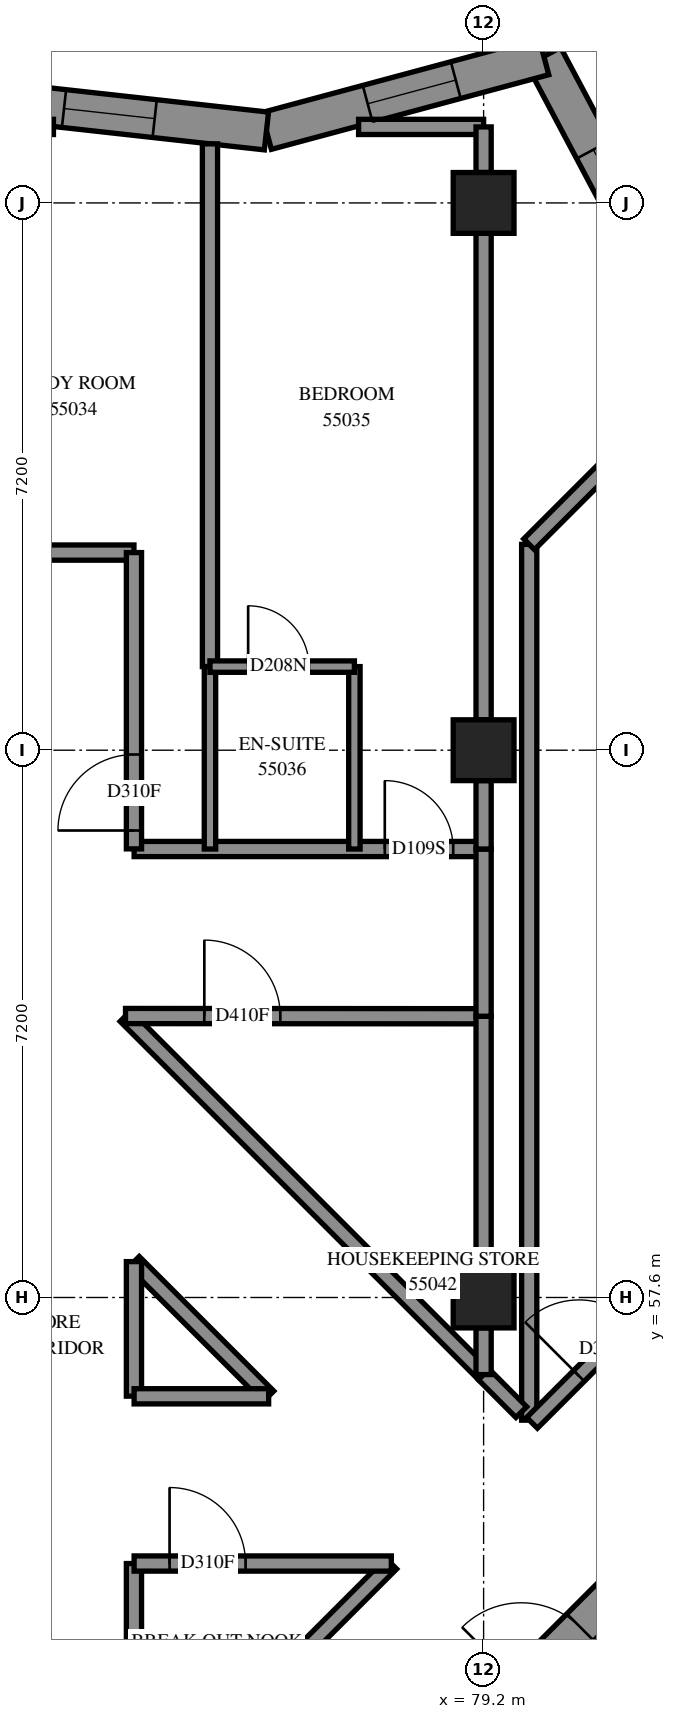
"""IFC4 building model, lengths in metres.
Left out: names, types, materials, properties, quantities, classifications, styles, units other than length and angle.
Written with IfcOpenShell. Run it as: python <this file> out.ifc"""

import sys

from ifc_helpers import new_model, si_unit, direction, frame, frame_2d, origin, origin_2d, place, context, subcontext, project, spatial, polyline, rectangle, outline, extrude, element, fill, save


model = new_model("IFC4")
c1 = context("Model", 3, precision=1e-05, world=origin(), true_north=direction((0.0, 1.0)))
c2 = subcontext(c1, "Body", "Model", "MODEL_VIEW")
j1 = project(units=[si_unit("LENGTHUNIT", "METRE"), si_unit("PLANEANGLEUNIT", "RADIAN")], contexts=[c1])
p1 = place(None, origin())
s1 = spatial("IfcSite", under=j1, at=p1, CompositionType="ELEMENT")
p2 = place(p1, origin())
s2 = spatial("IfcBuilding", under=s1, at=p2, CompositionType="ELEMENT")
p3 = place(p2, frame((0.0, 0.0, 203.2)))
s3 = spatial("IfcBuildingStorey", under=s2, at=p3, CompositionType="ELEMENT", Elevation=203.2)
for number, where, z_axis, x_axis in (
    (1, (79.2, 57.6, 0.0), (0.0, 0.0, 1.0), (1.0, 0.0, 0.0)),
    (2, (79.2, 64.8, 0.0), (0.0, 0.0, 1.0), (1.0, 0.0, 0.0)),
    (3, (79.2, 72.0, 0.0), (0.0, 0.0, 1.0), (1.0, 0.0, 0.0)),
):
    element("IfcColumn", number, at=place(p3, frame(where, z_axis=z_axis, x_axis=x_axis)), inside=s3, PredefinedType="COLUMN", context=c2, shape_type="SweptSolid", body=[
        extrude(rectangle(XDim=0.8, YDim=0.8, at=origin_2d()), origin(), (0.0, 0.0, 1.0), 3.1),
    ])
p4 = place(p3, frame((76.478, 49.267, -0.3), z_axis=(0.0, 0.0, 1.0), x_axis=(0.7071067812, 0.7071067812, 0.0)))
e4 = element("IfcWall", 4, at=p4, inside=s3, PredefinedType="SHEAR", context=c2, shape_type="SweptSolid", body=[
    extrude(rectangle(XDim=14.4, YDim=0.5, at=frame_2d((7.2, 0.0))), origin(), (0.0, 0.0, 1.0), 2.7),
])
p5 = place(p4, frame((4.55, 0.0, 0.3)))
e5 = element("IfcOpeningElement", 5, at=p5, cuts=e4, PredefinedType="OPENING", context=c2, shape_type="SweptSolid", body=[
    extrude(rectangle(XDim=1.1, YDim=2.1, at=frame_2d((0.55, 1.05))), frame((0.0, 0.26, 0.0), z_axis=(0.0, -1.0, 0.0), x_axis=(1.0, 0.0, 0.0)), (0.0, 0.0, 1.0), 0.52),
])
p6 = place(p4, frame((11.35, 0.0, 0.3)))
e6 = element("IfcOpeningElement", 6, at=p6, cuts=e4, PredefinedType="OPENING", context=c2, shape_type="SweptSolid", body=[
    extrude(rectangle(XDim=1.1, YDim=2.1, at=frame_2d((0.55, 1.05))), frame((0.0, 0.26, 0.0), z_axis=(0.0, -1.0, 0.0), x_axis=(1.0, 0.0, 0.0)), (0.0, 0.0, 1.0), 0.52),
])
p7 = place(p3, frame((81.558, 70.978, 0.0), z_axis=(0.0, 0.0, 1.0), x_axis=(-0.4689165571, 0.8832424709, 0.0)))
e7 = element("IfcWall", 7, at=p7, inside=s3, PredefinedType="SOLIDWALL", context=c2, shape_type="SweptSolid", body=[
    extrude(outline(polyline([(0.054, -0.25), (3.539, -0.25), (3.14, 0.25), (-0.054, 0.25), (0.054, -0.25)])), origin(), (0.0, 0.0, 1.0), 3.1),
])
p8 = place(p7, frame((0.75, 0.0, 0.45)))
e8 = element("IfcOpeningElement", 8, at=p8, cuts=e7, PredefinedType="OPENING", context=c2, shape_type="SweptSolid", body=[
    extrude(rectangle(XDim=1.2, YDim=2.5, at=frame_2d((0.6, 1.25))), frame((0.0, 0.26, 0.0), z_axis=(0.0, -1.0, 0.0), x_axis=(1.0, 0.0, 0.0)), (0.0, 0.0, 1.0), 0.52),
])
p9 = place(p3, frame((79.993, 73.928, 0.0), z_axis=(0.0, 0.0, 1.0), x_axis=(-0.9656859812, -0.259712506, 0.0)))
e9 = element("IfcWall", 9, at=p9, inside=s3, PredefinedType="SOLIDWALL", context=c2, shape_type="SweptSolid", body=[
    extrude(outline(polyline([(-0.199, -0.25), (3.732, -0.25), (3.826, 0.25), (0.199, 0.25), (-0.199, -0.25)])), origin(), (0.0, 0.0, 1.0), 3.1),
])
p10 = place(p9, frame((1.2, 0.0, 0.45)))
e10 = element("IfcOpeningElement", 10, at=p10, cuts=e9, PredefinedType="OPENING", context=c2, shape_type="SweptSolid", body=[
    extrude(rectangle(XDim=1.2, YDim=2.5, at=frame_2d((0.6, 1.25))), frame((0.0, 0.26, 0.0), z_axis=(0.0, -1.0, 0.0), x_axis=(1.0, 0.0, 0.0)), (0.0, 0.0, 1.0), 0.52),
])
p11 = place(p3, frame((76.343, 72.946, 0.0), z_axis=(0.0, 0.0, 1.0), x_axis=(-0.9939056334, 0.1102342595, 0.0)))
e11 = element("IfcWall", 11, at=p11, inside=s3, PredefinedType="SOLIDWALL", context=c2, shape_type="SweptSolid", body=[
    extrude(outline(polyline([(0.047, -0.25), (3.867, -0.25), (3.811, 0.25), (-0.047, 0.25), (0.047, -0.25)])), origin(), (0.0, 0.0, 1.0), 3.1),
])
p12 = place(p11, frame((1.48, 0.0, 0.45)))
e12 = element("IfcOpeningElement", 12, at=p12, cuts=e11, PredefinedType="OPENING", context=c2, shape_type="SweptSolid", body=[
    extrude(rectangle(XDim=1.2, YDim=2.5, at=frame_2d((0.6, 1.25))), frame((0.0, 0.26, 0.0), z_axis=(0.0, -1.0, 0.0), x_axis=(1.0, 0.0, 0.0)), (0.0, 0.0, 1.0), 0.52),
])
p13 = place(p3, frame((55.0, 67.4, 0.0), z_axis=(0.0, 0.0, 1.0), x_axis=(1.0, 0.0, 0.0)))
e13 = element("IfcWall", 13, at=p13, inside=s3, PredefinedType="PARTITIONING", context=c2, shape_type="SweptSolid", body=[
    extrude(rectangle(XDim=19.6, YDim=0.2, at=frame_2d((9.8, 0.0))), origin(), (0.0, 0.0, 1.0), 3.1),
])
p14 = place(p13, frame((6.499, 0.0, 0.0)))
e14 = element("IfcOpeningElement", 14, at=p14, cuts=e13, PredefinedType="OPENING", context=c2, shape_type="SweptSolid", body=[
    extrude(rectangle(XDim=0.9, YDim=2.1, at=frame_2d((0.45, 1.05))), frame((0.0, 0.11, 0.0), z_axis=(0.0, -1.0, 0.0), x_axis=(1.0, 0.0, 0.0)), (0.0, 0.0, 1.0), 0.22),
])
p15 = place(p13, frame((14.001, 0.0, 0.0)))
e15 = element("IfcOpeningElement", 15, at=p15, cuts=e13, PredefinedType="OPENING", context=c2, shape_type="SweptSolid", body=[
    extrude(rectangle(XDim=0.9, YDim=2.1, at=frame_2d((0.45, 1.05))), frame((0.0, 0.11, 0.0), z_axis=(0.0, -1.0, 0.0), x_axis=(1.0, 0.0, 0.0)), (0.0, 0.0, 1.0), 0.22),
])
p16 = place(p3, frame((79.8, 55.986, 0.0), z_axis=(0.0, 0.0, 1.0), x_axis=(0.0, 1.0, 0.0)))
e16 = element("IfcWall", 16, at=p16, inside=s3, PredefinedType="PARTITIONING", context=c2, shape_type="SweptSolid", body=[
    extrude(rectangle(XDim=11.522, YDim=0.2, at=frame_2d((5.761, 0.0))), origin(), (0.0, 0.0, 1.0), 3.1),
])
p17 = place(p3, frame((79.837, 55.951, 0.0), z_axis=(0.0, 0.0, 1.0), x_axis=(0.7071067812, 0.7071067812, 0.0)))
e17 = element("IfcWall", 17, at=p17, inside=s3, PredefinedType="PARTITIONING", context=c2, shape_type="SweptSolid", body=[
    extrude(rectangle(XDim=9.897, YDim=0.2, at=frame_2d((4.948, 0.0))), origin(), (0.0, 0.0, 1.0), 3.1),
])
p18 = place(p17, frame((0.873, 0.0, 0.0)))
e18 = element("IfcOpeningElement", 18, at=p18, cuts=e17, PredefinedType="OPENING", context=c2, shape_type="SweptSolid", body=[
    extrude(rectangle(XDim=1.0, YDim=2.1, at=frame_2d((0.5, 1.05))), frame((0.0, 0.11, 0.0), z_axis=(0.0, -1.0, 0.0), x_axis=(1.0, 0.0, 0.0)), (0.0, 0.0, 1.0), 0.22),
])
p19 = place(p3, frame((75.6, 65.9, 0.0), z_axis=(0.0, 0.0, 1.0), x_axis=(0.0, 1.0, 0.0)))
e19 = element("IfcWall", 19, at=p19, inside=s3, PredefinedType="PARTITIONING", context=c2, shape_type="SweptSolid", body=[
    extrude(rectangle(XDim=6.877, YDim=0.2, at=frame_2d((3.439, 0.0))), origin(), (0.0, 0.0, 1.0), 3.1),
])
p20 = place(p3, frame((74.489, 61.303, 0.0), z_axis=(0.0, 0.0, 1.0), x_axis=(0.7071892763, -0.7070242765, 0.0)))
e20 = element("IfcWall", 20, at=p20, inside=s3, PredefinedType="PARTITIONING", context=c2, shape_type="SweptSolid", body=[
    extrude(rectangle(XDim=6.667, YDim=0.2, at=frame_2d((3.333, 0.0))), origin(), (0.0, 0.0, 1.0), 3.1),
])
p21 = place(p3, frame((79.2, 65.2, 0.0), z_axis=(0.0, 0.0, 1.0), x_axis=(0.0, 1.0, 0.0)))
e21 = element("IfcWall", 21, at=p21, inside=s3, PredefinedType="PARTITIONING", context=c2, shape_type="SweptSolid", body=[
    extrude(rectangle(XDim=6.4, YDim=0.2, at=frame_2d((3.2, 0.0))), origin(), (0.0, 0.0, 1.0), 3.1),
])
p22 = place(p3, frame((74.601, 50.715, 0.0), z_axis=(0.0, 0.0, 1.0), x_axis=(0.7071067812, 0.7071067812, 0.0)))
e22 = element("IfcWall", 22, at=p22, inside=s3, PredefinedType="PARTITIONING", context=c2, shape_type="SweptSolid", body=[
    extrude(rectangle(XDim=4.786, YDim=0.2, at=frame_2d((2.393, 0.0))), origin(), (0.0, 0.0, 1.0), 3.1),
])
p23 = place(p3, frame((74.489, 61.303, 0.0), z_axis=(0.0, 0.0, 1.0), x_axis=(0.9999998105, -0.0006155543, 0.0)))
e23 = element("IfcWall", 23, at=p23, inside=s3, PredefinedType="PARTITIONING", context=c2, shape_type="SweptSolid", body=[
    extrude(rectangle(XDim=4.711, YDim=0.2, at=frame_2d((2.356, 0.0))), origin(), (0.0, 0.0, 1.0), 3.1),
])
p24 = place(p23, frame((1.037, 0.0, 0.0)))
e24 = element("IfcOpeningElement", 24, at=p24, cuts=e23, PredefinedType="OPENING", context=c2, shape_type="SweptSolid", body=[
    extrude(rectangle(XDim=1.0, YDim=2.1, at=frame_2d((0.5, 1.05))), frame((0.0, 0.11, 0.0), z_axis=(0.0, -1.0, 0.0), x_axis=(1.0, 0.0, 0.0)), (0.0, 0.0, 1.0), 0.22),
])
p25 = place(p3, frame((74.602, 63.5, 0.0), z_axis=(0.0, 0.0, 1.0), x_axis=(1.0, 0.0, 0.0)))
e25 = element("IfcWall", 25, at=p25, inside=s3, PredefinedType="PARTITIONING", context=c2, shape_type="SweptSolid", body=[
    extrude(rectangle(XDim=4.598, YDim=0.2, at=frame_2d((2.299, 0.0))), origin(), (0.0, 0.0, 1.0), 3.1),
])
p26 = place(p25, frame((3.298, 0.0, 0.0)))
e26 = element("IfcOpeningElement", 26, at=p26, cuts=e25, PredefinedType="OPENING", context=c2, shape_type="SweptSolid", body=[
    extrude(rectangle(XDim=0.9, YDim=2.1, at=frame_2d((0.45, 1.05))), frame((0.0, 0.11, 0.0), z_axis=(0.0, -1.0, 0.0), x_axis=(1.0, 0.0, 0.0)), (0.0, 0.0, 1.0), 0.22),
])
p27 = place(p3, frame((74.6, 63.502, 0.0), z_axis=(0.0, 0.0, 1.0), x_axis=(0.0, 1.0, 0.0)))
e27 = element("IfcWall", 27, at=p27, inside=s3, PredefinedType="PARTITIONING", context=c2, shape_type="SweptSolid", body=[
    extrude(rectangle(XDim=3.898, YDim=0.2, at=frame_2d((1.949, 0.0))), origin(), (0.0, 0.0, 1.0), 3.1),
])
p28 = place(p27, frame((0.242, 0.0, 0.0)))
e28 = element("IfcOpeningElement", 28, at=p28, cuts=e27, PredefinedType="OPENING", context=c2, shape_type="SweptSolid", body=[
    extrude(rectangle(XDim=1.0, YDim=2.1, at=frame_2d((0.5, 1.05))), frame((0.0, 0.11, 0.0), z_axis=(0.0, -1.0, 0.0), x_axis=(1.0, 0.0, 0.0)), (0.0, 0.0, 1.0), 0.22),
])
p29 = place(p3, frame((79.799, 67.509, 0.0), z_axis=(0.0, 0.0, 1.0), x_axis=(0.7070928849, 0.7071206772, 0.0)))
e29 = element("IfcWall", 29, at=p29, inside=s3, PredefinedType="PARTITIONING", context=c2, shape_type="SweptSolid", body=[
    extrude(rectangle(XDim=3.598, YDim=0.2, at=frame_2d((1.799, 0.0))), origin(), (0.0, 0.0, 1.0), 3.1),
])
p30 = place(p3, frame((74.6, 50.714, 0.0), z_axis=(0.0, 0.0, 1.0), x_axis=(0.0, 1.0, 0.0)))
e30 = element("IfcWall", 30, at=p30, inside=s3, PredefinedType="PARTITIONING", context=c2, shape_type="SweptSolid", body=[
    extrude(rectangle(XDim=3.386, YDim=0.2, at=frame_2d((1.693, 0.0))), origin(), (0.0, 0.0, 1.0), 3.1),
])
p31 = place(p3, frame((74.602, 54.1, 0.0), z_axis=(0.0, 0.0, 1.0), x_axis=(1.0, 0.0, 0.0)))
e31 = element("IfcWall", 31, at=p31, inside=s3, PredefinedType="PARTITIONING", context=c2, shape_type="SweptSolid", body=[
    extrude(rectangle(XDim=3.384, YDim=0.2, at=frame_2d((1.692, 0.0))), origin(), (0.0, 0.0, 1.0), 3.1),
])
p32 = place(p31, frame((0.467, 0.0, 0.0)))
e32 = element("IfcOpeningElement", 32, at=p32, cuts=e31, PredefinedType="OPENING", context=c2, shape_type="SweptSolid", body=[
    extrude(rectangle(XDim=1.0, YDim=2.1, at=frame_2d((0.5, 1.05))), frame((0.0, 0.11, 0.0), z_axis=(0.0, -1.0, 0.0), x_axis=(1.0, 0.0, 0.0)), (0.0, 0.0, 1.0), 0.22),
])
p33 = place(p3, frame((79.2, 58.0, 0.0), z_axis=(0.0, 0.0, 1.0), x_axis=(0.0, 1.0, 0.0)))
e33 = element("IfcWall", 33, at=p33, inside=s3, PredefinedType="PARTITIONING", context=c2, shape_type="SweptSolid", body=[
    extrude(rectangle(XDim=3.3, YDim=0.2, at=frame_2d((1.65, 0.0))), origin(), (0.0, 0.0, 1.0), 3.1),
])
p34 = place(p3, frame((74.599, 58.069, 0.0), z_axis=(0.0, 0.0, 1.0), x_axis=(0.7071067812, -0.7071067812, 0.0)))
e34 = element("IfcWall", 34, at=p34, inside=s3, PredefinedType="PARTITIONING", context=c2, shape_type="SweptSolid", body=[
    extrude(rectangle(XDim=2.503, YDim=0.2, at=frame_2d((1.252, 0.0))), origin(), (0.0, 0.0, 1.0), 3.1),
])
for number, where, z_axis, x_axis in (
    (35, (75.6, 63.5, 0.0), (0.0, 0.0, 1.0), (0.0, 1.0, 0.0)),
    (36, (77.5, 63.5, 0.0), (0.0, 0.0, 1.0), (0.0, 1.0, 0.0)),
):
    element("IfcWall", number, at=place(p3, frame(where, z_axis=z_axis, x_axis=x_axis)), inside=s3, PredefinedType="PARTITIONING", context=c2, shape_type="SweptSolid", body=[
        extrude(rectangle(XDim=2.4, YDim=0.15, at=frame_2d((1.2, 0.0))), origin(), (0.0, 0.0, 1.0), 3.1),
    ])
p35 = place(p3, frame((79.2, 61.3, 0.0), z_axis=(0.0, 0.0, 1.0), x_axis=(0.0, 1.0, 0.0)))
e37 = element("IfcWall", 37, at=p35, inside=s3, PredefinedType="PARTITIONING", context=c2, shape_type="SweptSolid", body=[
    extrude(rectangle(XDim=2.2, YDim=0.2, at=frame_2d((1.1, 0.0))), origin(), (0.0, 0.0, 1.0), 3.1),
])
p36 = place(p3, frame((71.514, 73.0, 0.0), z_axis=(0.0, 0.0, 1.0), x_axis=(1.0, 0.0, 0.0)))
e38 = element("IfcWall", 38, at=p36, inside=s3, PredefinedType="PARTITIONING", context=c2, shape_type="SweptSolid", body=[
    extrude(rectangle(XDim=2.027, YDim=0.2, at=frame_2d((1.013, 0.0))), origin(), (0.0, 0.0, 1.0), 3.1),
])
p37 = place(p3, frame((75.6, 65.9, 0.0), z_axis=(0.0, 0.0, 1.0), x_axis=(1.0, 0.0, 0.0)))
e39 = element("IfcWall", 39, at=p37, inside=s3, PredefinedType="PARTITIONING", context=c2, shape_type="SweptSolid", body=[
    extrude(rectangle(XDim=1.9, YDim=0.15, at=frame_2d((0.95, 0.0))), origin(), (0.0, 0.0, 1.0), 3.1),
])
p38 = place(p37, frame((0.502, 0.0, 0.0)))
e40 = element("IfcOpeningElement", 40, at=p38, cuts=e39, PredefinedType="OPENING", context=c2, shape_type="SweptSolid", body=[
    extrude(rectangle(XDim=0.8, YDim=2.1, at=frame_2d((0.4, 1.05))), frame((0.0, 0.085, 0.0), z_axis=(0.0, -1.0, 0.0), x_axis=(1.0, 0.0, 0.0)), (0.0, 0.0, 1.0), 0.17),
])
for number, where, z_axis, x_axis in (
    (41, (74.6, 56.302, 0.0), (0.0, 0.0, 1.0), (0.0, 1.0, 0.0)),
    (42, (74.602, 56.3, 0.0), (0.0, 0.0, 1.0), (1.0, 0.0, 0.0)),
):
    element("IfcWall", number, at=place(p3, frame(where, z_axis=z_axis, x_axis=x_axis)), inside=s3, PredefinedType="PARTITIONING", context=c2, shape_type="SweptSolid", body=[
        extrude(rectangle(XDim=1.77, YDim=0.2, at=frame_2d((0.885, 0.0))), origin(), (0.0, 0.0, 1.0), 3.1),
    ])
p39 = place(p3, frame((77.555, 73.0, 0.0), z_axis=(0.0, 0.0, 1.0), x_axis=(1.0, 0.0, 0.0)))
e43 = element("IfcWall", 43, at=p39, inside=s3, PredefinedType="PARTITIONING", context=c2, shape_type="SweptSolid", body=[
    extrude(rectangle(XDim=1.645, YDim=0.2, at=frame_2d((0.822, 0.0))), origin(), (0.0, 0.0, 1.0), 3.1),
])
p40 = place(p3, frame((79.2, 63.5, 0.0), z_axis=(0.0, 0.0, 1.0), x_axis=(0.0, 1.0, 0.0)))
e44 = element("IfcWall", 44, at=p40, inside=s3, PredefinedType="PARTITIONING", context=c2, shape_type="SweptSolid", body=[
    extrude(rectangle(XDim=0.9, YDim=0.2, at=frame_2d((0.45, 0.0))), origin(), (0.0, 0.0, 1.0), 3.1),
])
p41 = place(p3, frame((79.202, 56.588, 0.0), z_axis=(0.0, 0.0, 1.0), x_axis=(0.7056768426, -0.7085338339, 0.0)))
e45 = element("IfcWall", 45, at=p41, inside=s3, PredefinedType="PARTITIONING", context=c2, shape_type="SweptSolid", body=[
    extrude(rectangle(XDim=0.7, YDim=0.2, at=frame_2d((0.35, 0.0))), origin(), (0.0, 0.0, 1.0), 3.1),
])
p42 = place(p3, frame((79.2, 56.586, 0.0), z_axis=(0.0, 0.0, 1.0), x_axis=(0.0, 1.0, 0.0)))
e46 = element("IfcWall", 46, at=p42, inside=s3, PredefinedType="PARTITIONING", context=c2, shape_type="SweptSolid", body=[
    extrude(rectangle(XDim=0.614, YDim=0.2, at=frame_2d((0.307, 0.0))), origin(), (0.0, 0.0, 1.0), 3.1),
])
p43 = place(p3, frame((79.2, 72.4, 0.0), z_axis=(0.0, 0.0, 1.0), x_axis=(0.0, 1.0, 0.0)))
e47 = element("IfcWall", 47, at=p43, inside=s3, PredefinedType="PARTITIONING", context=c2, shape_type="SweptSolid", body=[
    extrude(rectangle(XDim=0.6, YDim=0.2, at=frame_2d((0.3, 0.0))), origin(), (0.0, 0.0, 1.0), 3.1),
])
p44 = place(p8, origin())
e48 = element("IfcWindow", 48, at=p44, inside=s3, PartitioningType="SINGLE_PANEL", PredefinedType="WINDOW", context=c2, shape_type="SweptSolid", body=[
    extrude(rectangle(XDim=1.2, YDim=2.5, at=frame_2d((0.6, 1.25))), frame((0.0, 0.18, 0.0), z_axis=(0.0, -1.0, 0.0), x_axis=(1.0, 0.0, 0.0)), (0.0, 0.0, 1.0), 0.06),
])
fill(e8, e48)
p45 = place(p10, origin())
e49 = element("IfcWindow", 49, at=p45, inside=s3, PartitioningType="SINGLE_PANEL", PredefinedType="WINDOW", context=c2, shape_type="SweptSolid", body=[
    extrude(rectangle(XDim=1.2, YDim=2.5, at=frame_2d((0.6, 1.25))), frame((0.0, 0.18, 0.0), z_axis=(0.0, -1.0, 0.0), x_axis=(1.0, 0.0, 0.0)), (0.0, 0.0, 1.0), 0.06),
])
fill(e10, e49)
p46 = place(p12, origin())
e50 = element("IfcWindow", 50, at=p46, inside=s3, PartitioningType="SINGLE_PANEL", PredefinedType="WINDOW", context=c2, shape_type="SweptSolid", body=[
    extrude(rectangle(XDim=1.2, YDim=2.5, at=frame_2d((0.6, 1.25))), frame((0.0, 0.18, 0.0), z_axis=(0.0, -1.0, 0.0), x_axis=(1.0, 0.0, 0.0)), (0.0, 0.0, 1.0), 0.06),
])
fill(e12, e50)
p47 = place(p5, origin())
e51 = element("IfcDoor", 51, at=p47, inside=s3, OperationType="DOUBLE_DOOR_SINGLE_SWING", PredefinedType="DOOR", context=c2, shape_type="SweptSolid", body=[
    extrude(rectangle(XDim=1.1, YDim=2.1, at=frame_2d((0.55, 1.05))), frame((0.0, 0.025, 0.0), z_axis=(0.0, -1.0, 0.0), x_axis=(1.0, 0.0, 0.0)), (0.0, 0.0, 1.0), 0.05),
])
fill(e5, e51)
p48 = place(p32, origin())
e52 = element("IfcDoor", 52, at=p48, inside=s3, OperationType="SINGLE_SWING_RIGHT", PredefinedType="DOOR", context=c2, shape_type="SweptSolid", body=[
    extrude(rectangle(XDim=1.0, YDim=2.1, at=frame_2d((0.5, 1.05))), frame((0.0, 0.025, 0.0), z_axis=(0.0, -1.0, 0.0), x_axis=(1.0, 0.0, 0.0)), (0.0, 0.0, 1.0), 0.05),
])
fill(e32, e52)
p49 = place(p28, origin())
e53 = element("IfcDoor", 53, at=p49, inside=s3, OperationType="SINGLE_SWING_RIGHT", PredefinedType="DOOR", context=c2, shape_type="SweptSolid", body=[
    extrude(rectangle(XDim=1.0, YDim=2.1, at=frame_2d((0.5, 1.05))), frame((0.0, 0.025, 0.0), z_axis=(0.0, -1.0, 0.0), x_axis=(1.0, 0.0, 0.0)), (0.0, 0.0, 1.0), 0.05),
])
fill(e28, e53)
p50 = place(p26, origin())
e54 = element("IfcDoor", 54, at=p50, inside=s3, OperationType="SINGLE_SWING_LEFT", PredefinedType="DOOR", context=c2, shape_type="SweptSolid", body=[
    extrude(rectangle(XDim=0.9, YDim=2.1, at=frame_2d((0.45, 1.05))), frame((0.0, 0.025, 0.0), z_axis=(0.0, -1.0, 0.0), x_axis=(1.0, 0.0, 0.0)), (0.0, 0.0, 1.0), 0.05),
])
fill(e26, e54)
p51 = place(p38, origin())
e55 = element("IfcDoor", 55, at=p51, inside=s3, OperationType="SINGLE_SWING_RIGHT", PredefinedType="DOOR", context=c2, shape_type="SweptSolid", body=[
    extrude(rectangle(XDim=0.8, YDim=2.1, at=frame_2d((0.4, 1.05))), frame((0.0, 0.025, 0.0), z_axis=(0.0, -1.0, 0.0), x_axis=(1.0, 0.0, 0.0)), (0.0, 0.0, 1.0), 0.05),
])
fill(e40, e55)
p52 = place(p24, origin())
e56 = element("IfcDoor", 56, at=p52, inside=s3, OperationType="SINGLE_SWING_RIGHT", PredefinedType="DOOR", context=c2, shape_type="SweptSolid", body=[
    extrude(rectangle(XDim=1.0, YDim=2.1, at=frame_2d((0.5, 1.05))), frame((0.0, 0.025, 0.0), z_axis=(0.0, -1.0, 0.0), x_axis=(1.0, 0.0, 0.0)), (0.0, 0.0, 1.0), 0.05),
])
fill(e24, e56)
p53 = place(p18, origin())
e57 = element("IfcDoor", 57, at=p53, inside=s3, OperationType="SINGLE_SWING_RIGHT", PredefinedType="DOOR", context=c2, shape_type="SweptSolid", body=[
    extrude(rectangle(XDim=1.0, YDim=2.1, at=frame_2d((0.5, 1.05))), frame((0.0, 0.025, 0.0), z_axis=(0.0, -1.0, 0.0), x_axis=(1.0, 0.0, 0.0)), (0.0, 0.0, 1.0), 0.05),
])
fill(e18, e57)
save(model, sys.argv[1])
